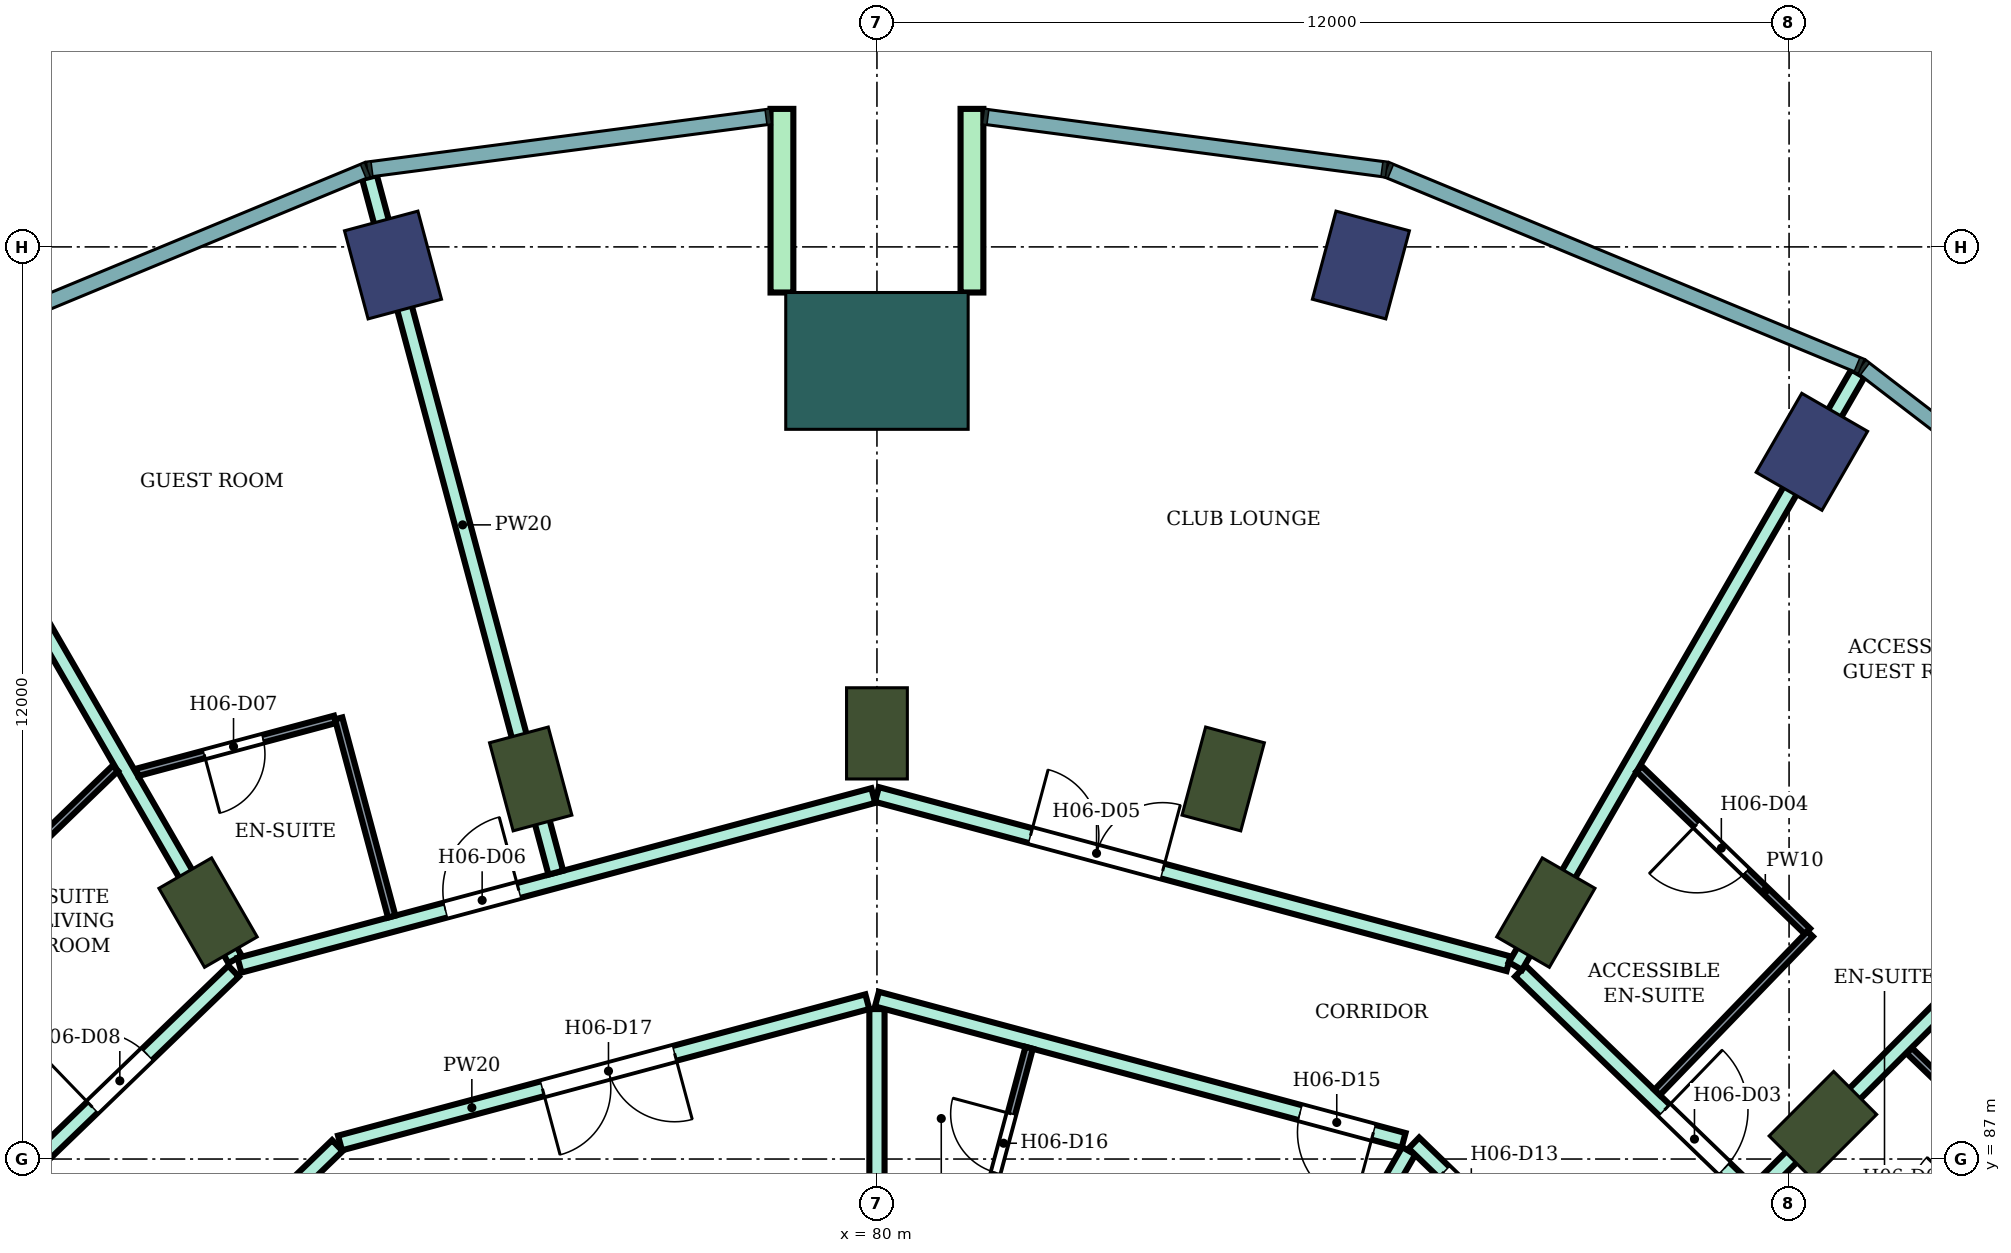
"""IFC4 building model, lengths in metres.
Left out: names, types, materials, properties, quantities, classifications, styles, units other than length and angle.
Written with IfcOpenShell. Run it as: python <this file> out.ifc"""

import sys

from ifc_helpers import new_model, si_unit, direction, frame, frame_2d, origin, origin_2d, place, context, subcontext, project, spatial, rectangle, extrude, element, fill, save


model = new_model("IFC4")
c1 = context("Model", 3, precision=1e-05, world=origin(), true_north=direction((0.0, 1.0)))
c2 = subcontext(c1, "Body", "Model", "MODEL_VIEW")
j1 = project(units=[si_unit("LENGTHUNIT", "METRE"), si_unit("PLANEANGLEUNIT", "RADIAN")], contexts=[c1])
p1 = place(None, origin())
s1 = spatial("IfcSite", under=j1, at=p1, CompositionType="ELEMENT")
p2 = place(p1, origin())
s2 = spatial("IfcBuilding", under=s1, at=p2, CompositionType="ELEMENT")
p3 = place(p2, frame((0.0, 0.0, 101.4)))
s3 = spatial("IfcBuildingStorey", under=s2, at=p3, CompositionType="ELEMENT", Elevation=101.4)
for number, where, z_axis, x_axis in (
    (1, (92.3, 96.304, 0.0), (0.0, 0.0, 1.0), (0.5, 0.866, 0.0)),
    (2, (86.367, 98.762, 0.0), (0.0, 0.0, 1.0), (0.259, 0.966, 0.0)),
    (3, (73.633, 98.762, 0.0), (0.0, 0.0, 1.0), (-0.259, 0.966, 0.0)),
):
    element("IfcColumn", number, at=place(p3, frame(where, z_axis=z_axis, x_axis=x_axis)), inside=s3, PredefinedType="COLUMN", context=c2, shape_type="SweptSolid", body=[
        extrude(rectangle(XDim=1.2, YDim=1.0, at=origin_2d()), origin(), (0.0, 0.0, 1.0), 3.8),
    ])
for number, where, z_axis, x_axis in (
    (4, (92.445, 87.445, 0.0), (0.0, 0.0, 1.0), (0.707, 0.707, 0.0)),
    (5, (88.8, 90.242, 0.0), (0.0, 0.0, 1.0), (0.5, 0.866, 0.0)),
    (6, (84.555, 92.0, 0.0), (0.0, 0.0, 1.0), (0.259, 0.966, 0.0)),
    (7, (80.0, 92.6, 0.0), (0.0, 0.0, 1.0), (0.0, 1.0, 0.0)),
    (8, (75.445, 92.0, 0.0), (0.0, 0.0, 1.0), (-0.259, 0.966, 0.0)),
    (9, (71.2, 90.242, 0.0), (0.0, 0.0, 1.0), (-0.5, 0.866, 0.0)),
):
    element("IfcColumn", number, at=place(p3, frame(where, z_axis=z_axis, x_axis=x_axis)), inside=s3, PredefinedType="COLUMN", context=c2, shape_type="SweptSolid", body=[
        extrude(rectangle(XDim=1.2, YDim=0.8, at=origin_2d()), origin(), (0.0, 0.0, 1.0), 3.8),
    ])
p4 = place(p3, frame((80.0, 97.5, 0.0), z_axis=(0.0, 0.0, 1.0), x_axis=(0.0, 1.0, 0.0)))
e10 = element("IfcColumn", 10, at=p4, inside=s3, PredefinedType="COLUMN", context=c2, shape_type="SweptSolid", body=[
    extrude(rectangle(XDim=1.8, YDim=2.4, at=origin_2d()), origin(), (0.0, 0.0, 1.0), 3.8),
])
for number, where, z_axis, x_axis in (
    (11, (81.25, 98.4, 0.0), (0.0, 0.0, 1.0), (0.0, 1.0, 0.0)),
    (12, (78.75, 98.4, 0.0), (0.0, 0.0, 1.0), (0.0, 1.0, 0.0)),
):
    element("IfcWall", number, at=place(p3, frame(where, z_axis=z_axis, x_axis=x_axis)), inside=s3, PredefinedType="NOTDEFINED", context=c2, shape_type="SweptSolid", body=[
        extrude(rectangle(XDim=2.416, YDim=0.3, at=frame_2d((1.208, 0.0))), origin(), (0.0, 0.0, 1.0), 3.8),
    ])
p5 = place(p3, frame((66.796, 84.9, 0.0), z_axis=(0.0, 0.0, 1.0), x_axis=(0.719690784855, 0.694294731505, 0.0)))
e13 = element("IfcWall", 13, at=p5, inside=s3, PredefinedType="PARTITIONING", context=c2, shape_type="SweptSolid", body=[
    extrude(rectangle(XDim=6.585, YDim=0.2, at=frame_2d((3.292, 0.0))), origin(), (0.0, 0.0, 1.0), 3.35),
])
p6 = place(p5, frame((4.006, 0.0, 0.0)))
e14 = element("IfcOpeningElement", 14, at=p6, cuts=e13, PredefinedType="OPENING", context=c2, shape_type="SweptSolid", body=[
    extrude(rectangle(XDim=1.0, YDim=2.1, at=frame_2d((0.5, 1.05))), frame((0.0, 0.11, 0.0), z_axis=(0.0, -1.0, 0.0), x_axis=(1.0, 0.0, 0.0)), (0.0, 0.0, 1.0), 0.22),
])
p7 = place(p3, frame((67.102, 97.342, 0.0), z_axis=(0.0, 0.0, 1.0), x_axis=(0.499900389553, -0.866082906265, 0.0)))
e15 = element("IfcWall", 15, at=p7, inside=s3, PredefinedType="PARTITIONING", context=c2, shape_type="SweptSolid", body=[
    extrude(rectangle(XDim=8.908, YDim=0.2, at=frame_2d((4.454, 0.0))), origin(), (0.0, 0.0, 1.0), 3.35),
])
p8 = place(p3, frame((68.987, 83.4, 0.0), z_axis=(0.0, 0.0, 1.0), x_axis=(0.719586298962, 0.694403022997, 0.0)))
e16 = element("IfcWall", 16, at=p8, inside=s3, PredefinedType="PARTITIONING", context=c2, shape_type="SweptSolid", body=[
    extrude(rectangle(XDim=5.439, YDim=0.2, at=frame_2d((2.719, 0.0))), origin(), (0.0, 0.0, 1.0), 3.35),
])
p9 = place(p3, frame((71.614, 89.55, 0.0), z_axis=(0.0, 0.0, 1.0), x_axis=(0.965982378603, 0.258607896685, 0.0)))
e17 = element("IfcWall", 17, at=p9, inside=s3, PredefinedType="PARTITIONING", context=c2, shape_type="SweptSolid", body=[
    extrude(rectangle(XDim=8.632, YDim=0.2, at=frame_2d((4.316, 0.0))), origin(), (0.0, 0.0, 1.0), 3.35),
])
p10 = place(p9, frame((2.804, 0.0, 0.0)))
e18 = element("IfcOpeningElement", 18, at=p10, cuts=e17, PredefinedType="OPENING", context=c2, shape_type="SweptSolid", body=[
    extrude(rectangle(XDim=1.0, YDim=2.1, at=frame_2d((0.5, 1.05))), frame((0.0, 0.11, 0.0), z_axis=(0.0, -1.0, 0.0), x_axis=(1.0, 0.0, 0.0)), (0.0, 0.0, 1.0), 0.22),
])
p11 = place(p3, frame((72.936, 87.211, 0.0), z_axis=(0.0, 0.0, 1.0), x_axis=(0.965917703859, 0.258849356521, 0.0)))
e19 = element("IfcWall", 19, at=p11, inside=s3, PredefinedType="PARTITIONING", context=c2, shape_type="SweptSolid", body=[
    extrude(rectangle(XDim=7.182, YDim=0.2, at=frame_2d((3.591, 0.0))), origin(), (0.0, 0.0, 1.0), 3.35),
])
p12 = place(p11, frame((2.757, 0.0, 0.0)))
e20 = element("IfcOpeningElement", 20, at=p12, cuts=e19, PredefinedType="OPENING", context=c2, shape_type="SweptSolid", body=[
    extrude(rectangle(XDim=1.8, YDim=2.1, at=frame_2d((0.9, 1.05))), frame((0.0, 0.11, 0.0), z_axis=(0.0, -1.0, 0.0), x_axis=(1.0, 0.0, 0.0)), (0.0, 0.0, 1.0), 0.22),
])
p13 = place(p3, frame((73.323, 99.918, 0.0), z_axis=(0.0, 0.0, 1.0), x_axis=(0.258812513968, -0.965927576278, 0.0)))
e21 = element("IfcWall", 21, at=p13, inside=s3, PredefinedType="PARTITIONING", context=c2, shape_type="SweptSolid", body=[
    extrude(rectangle(XDim=9.474, YDim=0.2, at=frame_2d((4.737, 0.0))), origin(), (0.0, 0.0, 1.0), 3.35),
])
p14 = place(p3, frame((80.0, 82.7, 0.0), z_axis=(0.0, 0.0, 1.0), x_axis=(0.0, 1.0, 0.0)))
e22 = element("IfcWall", 22, at=p14, inside=s3, PredefinedType="PARTITIONING", context=c2, shape_type="SweptSolid", body=[
    extrude(rectangle(XDim=6.273, YDim=0.2, at=frame_2d((3.136, 0.0))), origin(), (0.0, 0.0, 1.0), 3.35),
])
p15 = place(p3, frame((80.0, 89.104, 0.0), z_axis=(0.0, 0.0, 1.0), x_axis=(0.965856548257, -0.259077455964, 0.0)))
e23 = element("IfcWall", 23, at=p15, inside=s3, PredefinedType="PARTITIONING", context=c2, shape_type="SweptSolid", body=[
    extrude(rectangle(XDim=7.173, YDim=0.2, at=frame_2d((3.586, 0.0))), origin(), (0.0, 0.0, 1.0), 3.35),
])
p16 = place(p15, frame((5.763, 0.0, 0.0)))
e24 = element("IfcOpeningElement", 24, at=p16, cuts=e23, PredefinedType="OPENING", context=c2, shape_type="SweptSolid", body=[
    extrude(rectangle(XDim=1.0, YDim=2.1, at=frame_2d((0.5, 1.05))), frame((0.0, 0.11, 0.0), z_axis=(0.0, -1.0, 0.0), x_axis=(1.0, 0.0, 0.0)), (0.0, 0.0, 1.0), 0.22),
])
p17 = place(p3, frame((80.0, 91.796, 0.0), z_axis=(0.0, 0.0, 1.0), x_axis=(0.965917643923, -0.258849580177, 0.0)))
e25 = element("IfcWall", 25, at=p17, inside=s3, PredefinedType="PARTITIONING", context=c2, shape_type="SweptSolid", body=[
    extrude(rectangle(XDim=8.602, YDim=0.2, at=frame_2d((4.301, 0.0))), origin(), (0.0, 0.0, 1.0), 3.35),
])
p18 = place(p17, frame((2.091, 0.0, 0.0)))
e26 = element("IfcOpeningElement", 26, at=p18, cuts=e25, PredefinedType="OPENING", context=c2, shape_type="SweptSolid", body=[
    extrude(rectangle(XDim=1.8, YDim=2.1, at=frame_2d((0.9, 1.05))), frame((0.0, 0.11, 0.0), z_axis=(0.0, -1.0, 0.0), x_axis=(1.0, 0.0, 0.0)), (0.0, 0.0, 1.0), 0.22),
])
p19 = place(p3, frame((83.852, 81.665, 0.0), z_axis=(0.0, 0.0, 1.0), x_axis=(0.500236829077, 0.86588862727, 0.0)))
e27 = element("IfcWall", 27, at=p19, inside=s3, PredefinedType="PARTITIONING", context=c2, shape_type="SweptSolid", body=[
    extrude(rectangle(XDim=6.286, YDim=0.2, at=frame_2d((3.143, 0.0))), origin(), (0.0, 0.0, 1.0), 3.35),
])
p20 = place(p3, frame((87.064, 87.211, 0.0), z_axis=(0.0, 0.0, 1.0), x_axis=(0.719540958932, -0.694450004262, 0.0)))
e28 = element("IfcWall", 28, at=p20, inside=s3, PredefinedType="PARTITIONING", context=c2, shape_type="SweptSolid", body=[
    extrude(rectangle(XDim=5.488, YDim=0.2, at=frame_2d((2.744, 0.0))), origin(), (0.0, 0.0, 1.0), 3.35),
])
p21 = place(p20, frame((0.55, 0.0, 0.0)))
e29 = element("IfcOpeningElement", 29, at=p21, cuts=e28, PredefinedType="OPENING", context=c2, shape_type="SweptSolid", body=[
    extrude(rectangle(XDim=1.0, YDim=2.1, at=frame_2d((0.5, 1.05))), frame((0.0, 0.11, 0.0), z_axis=(0.0, -1.0, 0.0), x_axis=(1.0, 0.0, 0.0)), (0.0, 0.0, 1.0), 0.22),
])
p22 = place(p3, frame((88.465, 89.473, 0.0), z_axis=(0.0, 0.0, 1.0), x_axis=(0.719474304909, -0.694519059908, 0.0)))
e30 = element("IfcWall", 30, at=p22, inside=s3, PredefinedType="PARTITIONING", context=c2, shape_type="SweptSolid", body=[
    extrude(rectangle(XDim=6.525, YDim=0.2, at=frame_2d((3.263, 0.0))), origin(), (0.0, 0.0, 1.0), 3.35),
])
p23 = place(p22, frame((2.633, 0.0, 0.0)))
e31 = element("IfcOpeningElement", 31, at=p23, cuts=e30, PredefinedType="OPENING", context=c2, shape_type="SweptSolid", body=[
    extrude(rectangle(XDim=1.1, YDim=2.1, at=frame_2d((0.55, 1.05))), frame((0.0, 0.11, 0.0), z_axis=(0.0, -1.0, 0.0), x_axis=(1.0, 0.0, 0.0)), (0.0, 0.0, 1.0), 0.22),
])
p24 = place(p3, frame((88.4, 89.538, 0.0), z_axis=(0.0, 0.0, 1.0), x_axis=(0.500234695877, 0.865889859648, 0.0)))
e32 = element("IfcWall", 32, at=p24, inside=s3, PredefinedType="PARTITIONING", context=c2, shape_type="SweptSolid", body=[
    extrude(rectangle(XDim=9.007, YDim=0.2, at=frame_2d((4.503, 0.0))), origin(), (0.0, 0.0, 1.0), 3.35),
])
p25 = place(p3, frame((91.595, 86.59, 0.0), z_axis=(0.0, 0.0, 1.0), x_axis=(0.707232337591, 0.706981202484, 0.0)))
e33 = element("IfcWall", 33, at=p25, inside=s3, PredefinedType="PARTITIONING", context=c2, shape_type="SweptSolid", body=[
    extrude(rectangle(XDim=6.805, YDim=0.2, at=frame_2d((3.402, 0.0))), origin(), (0.0, 0.0, 1.0), 3.35),
])
p26 = place(p3, frame((66.436, 88.72, 0.0), z_axis=(0.0, 0.0, 1.0), x_axis=(0.719585934284, 0.694403400899, 0.0)))
e34 = element("IfcWall", 34, at=p26, inside=s3, PredefinedType="PARTITIONING", context=c2, shape_type="SweptSolid", body=[
    extrude(rectangle(XDim=4.925, YDim=0.1, at=frame_2d((2.462, 0.0))), origin(), (0.0, 0.0, 1.0), 3.35),
])
p27 = place(p26, frame((1.022, 0.0, 0.0)))
e35 = element("IfcOpeningElement", 35, at=p27, cuts=e34, PredefinedType="OPENING", context=c2, shape_type="SweptSolid", body=[
    extrude(rectangle(XDim=0.9, YDim=2.1, at=frame_2d((0.45, 1.05))), frame((0.0, 0.06, 0.0), z_axis=(0.0, -1.0, 0.0), x_axis=(1.0, 0.0, 0.0)), (0.0, 0.0, 1.0), 0.12),
])
p28 = place(p3, frame((70.268, 92.087, 0.0), z_axis=(0.0, 0.0, 1.0), x_axis=(0.965937937835, 0.258773839966, 0.0)))
e36 = element("IfcWall", 36, at=p28, inside=s3, PredefinedType="PARTITIONING", context=c2, shape_type="SweptSolid", body=[
    extrude(rectangle(XDim=2.694, YDim=0.1, at=frame_2d((1.347, 0.0))), origin(), (0.0, 0.0, 1.0), 3.35),
])
p29 = place(p28, frame((0.912, 0.0, 0.0)))
e37 = element("IfcOpeningElement", 37, at=p29, cuts=e36, PredefinedType="OPENING", context=c2, shape_type="SweptSolid", body=[
    extrude(rectangle(XDim=0.8, YDim=2.1, at=frame_2d((0.4, 1.05))), frame((0.0, 0.06, 0.0), z_axis=(0.0, -1.0, 0.0), x_axis=(1.0, 0.0, 0.0)), (0.0, 0.0, 1.0), 0.12),
])
p30 = place(p3, frame((72.918, 92.797, 0.0), z_axis=(0.0, 0.0, 1.0), x_axis=(0.25867580527, -0.965964195904, 0.0)))
e38 = element("IfcWall", 38, at=p30, inside=s3, PredefinedType="PARTITIONING", context=c2, shape_type="SweptSolid", body=[
    extrude(rectangle(XDim=2.699, YDim=0.1, at=frame_2d((1.35, 0.0))), origin(), (0.0, 0.0, 1.0), 3.35),
])
p31 = place(p3, frame((81.304, 85.856, 0.0), z_axis=(0.0, 0.0, 1.0), x_axis=(0.25867580527, 0.965964195904, 0.0)))
e39 = element("IfcWall", 39, at=p31, inside=s3, PredefinedType="PARTITIONING", context=c2, shape_type="SweptSolid", body=[
    extrude(rectangle(XDim=2.699, YDim=0.1, at=frame_2d((1.35, 0.0))), origin(), (0.0, 0.0, 1.0), 3.35),
])
p32 = place(p31, frame((1.0, 0.0, 0.0)))
e40 = element("IfcOpeningElement", 40, at=p32, cuts=e39, PredefinedType="OPENING", context=c2, shape_type="SweptSolid", body=[
    extrude(rectangle(XDim=0.8, YDim=2.1, at=frame_2d((0.4, 1.05))), frame((0.0, 0.06, 0.0), z_axis=(0.0, -1.0, 0.0), x_axis=(1.0, 0.0, 0.0)), (0.0, 0.0, 1.0), 0.12),
])
p33 = place(p3, frame((90.027, 92.134, 0.0), z_axis=(0.0, 0.0, 1.0), x_axis=(0.719415132118, -0.694580353652, 0.0)))
e41 = element("IfcWall", 41, at=p33, inside=s3, PredefinedType="PARTITIONING", context=c2, shape_type="SweptSolid", body=[
    extrude(rectangle(XDim=3.077, YDim=0.1, at=frame_2d((1.539, 0.0))), origin(), (0.0, 0.0, 1.0), 3.35),
])
p34 = place(p33, frame((1.053, 0.0, 0.0)))
e42 = element("IfcOpeningElement", 42, at=p34, cuts=e41, PredefinedType="OPENING", context=c2, shape_type="SweptSolid", body=[
    extrude(rectangle(XDim=0.9, YDim=2.1, at=frame_2d((0.45, 1.05))), frame((0.0, 0.06, 0.0), z_axis=(0.0, -1.0, 0.0), x_axis=(1.0, 0.0, 0.0)), (0.0, 0.0, 1.0), 0.12),
])
p35 = place(p3, frame((90.263, 87.876, 0.0), z_axis=(0.0, 0.0, 1.0), x_axis=(0.694534400859, 0.719459495749, 0.0)))
e43 = element("IfcWall", 43, at=p35, inside=s3, PredefinedType="PARTITIONING", context=c2, shape_type="SweptSolid", body=[
    extrude(rectangle(XDim=2.899, YDim=0.1, at=frame_2d((1.45, 0.0))), origin(), (0.0, 0.0, 1.0), 3.35),
])
p36 = place(p3, frame((93.104, 85.136, 0.0), z_axis=(0.0, 0.0, 1.0), x_axis=(0.694324808789, 0.719661767708, 0.0)))
e44 = element("IfcWall", 44, at=p36, inside=s3, PredefinedType="PARTITIONING", context=c2, shape_type="SweptSolid", body=[
    extrude(rectangle(XDim=2.65, YDim=0.1, at=frame_2d((1.325, 0.0))), origin(), (0.0, 0.0, 1.0), 3.35),
])
p37 = place(p36, frame((1.05, 0.0, 0.0)))
e45 = element("IfcOpeningElement", 45, at=p37, cuts=e44, PredefinedType="OPENING", context=c2, shape_type="SweptSolid", body=[
    extrude(rectangle(XDim=0.8, YDim=2.1, at=frame_2d((0.4, 1.05))), frame((0.0, 0.06, 0.0), z_axis=(0.0, -1.0, 0.0), x_axis=(1.0, 0.0, 0.0)), (0.0, 0.0, 1.0), 0.12),
])
p38 = place(p3, frame((93.582, 88.426, 0.0), z_axis=(0.0, 0.0, 1.0), x_axis=(0.719707242969, -0.694277670977, 0.0)))
e46 = element("IfcWall", 46, at=p38, inside=s3, PredefinedType="PARTITIONING", context=c2, shape_type="SweptSolid", body=[
    extrude(rectangle(XDim=1.939, YDim=0.1, at=frame_2d((0.97, 0.0))), origin(), (0.0, 0.0, 1.0), 3.35),
])
p39 = place(p23, origin())
e47 = element("IfcDoor", 47, at=p39, inside=s3, OperationType="SINGLE_SWING_LEFT", PredefinedType="DOOR", context=c2, shape_type="SweptSolid", body=[
    extrude(rectangle(XDim=1.1, YDim=2.1, at=frame_2d((0.55, 1.05))), frame((0.0, 0.025, 0.0), z_axis=(0.0, -1.0, 0.0), x_axis=(1.0, 0.0, 0.0)), (0.0, 0.0, 1.0), 0.05),
])
fill(e31, e47)
p40 = place(p34, frame((0.9, 0.0, 0.0), z_axis=(0.0, 0.0, 1.0), x_axis=(-1.0, 0.0, 0.0)))
e48 = element("IfcDoor", 48, at=p40, inside=s3, OperationType="SINGLE_SWING_RIGHT", PredefinedType="DOOR", context=c2, shape_type="SweptSolid", body=[
    extrude(rectangle(XDim=0.9, YDim=2.1, at=frame_2d((0.45, 1.05))), frame((0.0, 0.025, 0.0), z_axis=(0.0, -1.0, 0.0), x_axis=(1.0, 0.0, 0.0)), (0.0, 0.0, 1.0), 0.05),
])
fill(e42, e48)
p41 = place(p18, origin())
e49 = element("IfcDoor", 49, at=p41, inside=s3, OperationType="DOUBLE_DOOR_SINGLE_SWING", PredefinedType="DOOR", context=c2, shape_type="SweptSolid", body=[
    extrude(rectangle(XDim=1.8, YDim=2.1, at=frame_2d((0.9, 1.05))), frame((0.0, 0.025, 0.0), z_axis=(0.0, -1.0, 0.0), x_axis=(1.0, 0.0, 0.0)), (0.0, 0.0, 1.0), 0.05),
])
fill(e26, e49)
p42 = place(p10, origin())
e50 = element("IfcDoor", 50, at=p42, inside=s3, OperationType="SINGLE_SWING_RIGHT", PredefinedType="DOOR", context=c2, shape_type="SweptSolid", body=[
    extrude(rectangle(XDim=1.0, YDim=2.1, at=frame_2d((0.5, 1.05))), frame((0.0, 0.025, 0.0), z_axis=(0.0, -1.0, 0.0), x_axis=(1.0, 0.0, 0.0)), (0.0, 0.0, 1.0), 0.05),
])
fill(e18, e50)
p43 = place(p29, frame((0.8, 0.0, 0.0), z_axis=(0.0, 0.0, 1.0), x_axis=(-1.0, 0.0, 0.0)))
e51 = element("IfcDoor", 51, at=p43, inside=s3, OperationType="SINGLE_SWING_RIGHT", PredefinedType="DOOR", context=c2, shape_type="SweptSolid", body=[
    extrude(rectangle(XDim=0.8, YDim=2.1, at=frame_2d((0.4, 1.05))), frame((0.0, 0.025, 0.0), z_axis=(0.0, -1.0, 0.0), x_axis=(1.0, 0.0, 0.0)), (0.0, 0.0, 1.0), 0.05),
])
fill(e37, e51)
p44 = place(p6, origin())
e52 = element("IfcDoor", 52, at=p44, inside=s3, OperationType="SINGLE_SWING_LEFT", PredefinedType="DOOR", context=c2, shape_type="SweptSolid", body=[
    extrude(rectangle(XDim=1.0, YDim=2.1, at=frame_2d((0.5, 1.05))), frame((0.0, 0.025, 0.0), z_axis=(0.0, -1.0, 0.0), x_axis=(1.0, 0.0, 0.0)), (0.0, 0.0, 1.0), 0.05),
])
fill(e14, e52)
p45 = place(p21, frame((1.0, 0.0, 0.0), z_axis=(0.0, 0.0, 1.0), x_axis=(-1.0, 0.0, 0.0)))
e53 = element("IfcDoor", 53, at=p45, inside=s3, OperationType="SINGLE_SWING_RIGHT", PredefinedType="DOOR", context=c2, shape_type="SweptSolid", body=[
    extrude(rectangle(XDim=1.0, YDim=2.1, at=frame_2d((0.5, 1.05))), frame((0.0, 0.025, 0.0), z_axis=(0.0, -1.0, 0.0), x_axis=(1.0, 0.0, 0.0)), (0.0, 0.0, 1.0), 0.05),
])
fill(e29, e53)
p46 = place(p16, frame((1.0, 0.0, 0.0), z_axis=(0.0, 0.0, 1.0), x_axis=(-1.0, 0.0, 0.0)))
e54 = element("IfcDoor", 54, at=p46, inside=s3, OperationType="SINGLE_SWING_LEFT", PredefinedType="DOOR", context=c2, shape_type="SweptSolid", body=[
    extrude(rectangle(XDim=1.0, YDim=2.1, at=frame_2d((0.5, 1.05))), frame((0.0, 0.025, 0.0), z_axis=(0.0, -1.0, 0.0), x_axis=(1.0, 0.0, 0.0)), (0.0, 0.0, 1.0), 0.05),
])
fill(e24, e54)
p47 = place(p32, origin())
e55 = element("IfcDoor", 55, at=p47, inside=s3, OperationType="SINGLE_SWING_RIGHT", PredefinedType="DOOR", context=c2, shape_type="SweptSolid", body=[
    extrude(rectangle(XDim=0.8, YDim=2.1, at=frame_2d((0.4, 1.05))), frame((0.0, 0.025, 0.0), z_axis=(0.0, -1.0, 0.0), x_axis=(1.0, 0.0, 0.0)), (0.0, 0.0, 1.0), 0.05),
])
fill(e40, e55)
p48 = place(p12, frame((1.8, 0.0, 0.0), z_axis=(0.0, 0.0, 1.0), x_axis=(-1.0, 0.0, 0.0)))
e56 = element("IfcDoor", 56, at=p48, inside=s3, OperationType="DOUBLE_DOOR_SINGLE_SWING", PredefinedType="DOOR", context=c2, shape_type="SweptSolid", body=[
    extrude(rectangle(XDim=1.8, YDim=2.1, at=frame_2d((0.9, 1.05))), frame((0.0, 0.025, 0.0), z_axis=(0.0, -1.0, 0.0), x_axis=(1.0, 0.0, 0.0)), (0.0, 0.0, 1.0), 0.05),
])
fill(e20, e56)
save(model, sys.argv[1])
